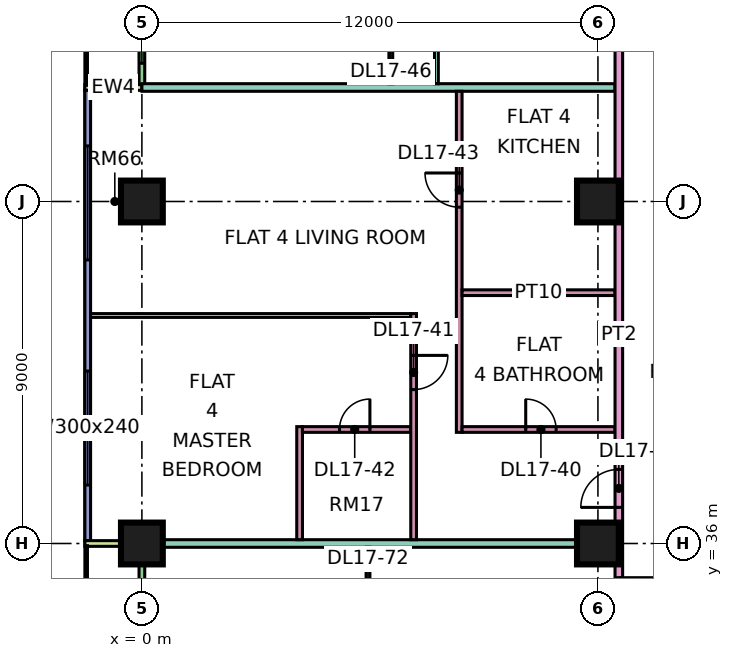
"""IFC4 building model, lengths in metres.
Left out: names, types, materials, properties, quantities, classifications, styles, units other than length and angle.
Written with IfcOpenShell. Run it as: python <this file> out.ifc"""

import sys

from ifc_helpers import new_model, si_unit, direction, frame, frame_2d, origin, origin_2d, place, context, subcontext, project, spatial, rectangle, extrude, element, fill, save


model = new_model("IFC4")
c1 = context("Model", 3, precision=1e-05, world=origin(), true_north=direction((0.0, 1.0)))
c2 = subcontext(c1, "Body", "Model", "MODEL_VIEW")
j1 = project(units=[si_unit("LENGTHUNIT", "METRE"), si_unit("PLANEANGLEUNIT", "RADIAN")], contexts=[c1])
p1 = place(None, origin())
s1 = spatial("IfcSite", under=j1, at=p1, CompositionType="ELEMENT")
p2 = place(p1, origin())
s2 = spatial("IfcBuilding", under=s1, at=p2, CompositionType="ELEMENT")
p3 = place(p2, frame((0.0, 0.0, 78.9)))
s3 = spatial("IfcBuildingStorey", under=s2, at=p3, CompositionType="ELEMENT", Elevation=78.9)
p4 = place(p3, frame((0.0, 36.0, 0.0), z_axis=(0.0, 0.0, 1.0), x_axis=(1.0, 0.0, 0.0)))
e1 = element("IfcColumn", 1, at=p4, inside=s3, PredefinedType="COLUMN", context=c2, shape_type="SweptSolid", body=[
    extrude(rectangle(XDim=1.1, YDim=1.1, at=origin_2d()), origin(), (0.0, 0.0, 1.0), 3.75),
])
for number, where, z_axis, x_axis in (
    (2, (0.0, 45.0, 0.0), (0.0, 0.0, 1.0), (1.0, 0.0, 0.0)),
    (3, (12.0, 36.0, 0.0), (0.0, 0.0, 1.0), (1.0, 0.0, 0.0)),
    (4, (12.0, 45.0, 0.0), (0.0, 0.0, 1.0), (1.0, 0.0, 0.0)),
):
    element("IfcColumn", number, at=place(p3, frame(where, z_axis=z_axis, x_axis=x_axis)), inside=s3, PredefinedType="COLUMN", context=c2, shape_type="SweptSolid", body=[
        extrude(rectangle(XDim=1.1, YDim=1.1, at=origin_2d()), origin(), (0.0, 0.0, 1.0), 3.75),
    ])
p5 = place(p3, frame((0.0, 61.425, 0.0), z_axis=(0.0, 0.0, 1.0), x_axis=(0.0, -1.0, 0.0)))
e5 = element("IfcWall", 5, at=p5, inside=s3, PredefinedType="SOLIDWALL", context=c2, shape_type="SweptSolid", body=[
    extrude(rectangle(XDim=13.35, YDim=0.15, at=frame_2d((6.675, 0.0))), origin(), (0.0, 0.0, 1.0), 3.35),
])
p6 = place(p5, frame((0.262, 0.0, 0.45)))
e6 = element("IfcOpeningElement", 6, at=p6, cuts=e5, PredefinedType="OPENING", context=c2, shape_type="SweptSolid", body=[
    extrude(rectangle(XDim=0.9, YDim=2.4, at=frame_2d((0.45, 1.2))), frame((0.0, 0.085, 0.0), z_axis=(0.0, -1.0, 0.0), x_axis=(1.0, 0.0, 0.0)), (0.0, 0.0, 1.0), 0.17),
])
p7 = place(p5, frame((3.2, 0.0, 0.0)))
e7 = element("IfcOpeningElement", 7, at=p7, cuts=e5, PredefinedType="OPENING", context=c2, shape_type="SweptSolid", body=[
    extrude(rectangle(XDim=1.8, YDim=2.4, at=frame_2d((0.9, 1.2))), frame((0.0, 0.085, 0.0), z_axis=(0.0, -1.0, 0.0), x_axis=(1.0, 0.0, 0.0)), (0.0, 0.0, 1.0), 0.17),
])
p8 = place(p5, frame((8.65, 0.0, 0.45)))
e8 = element("IfcOpeningElement", 8, at=p8, cuts=e5, PredefinedType="OPENING", context=c2, shape_type="SweptSolid", body=[
    extrude(rectangle(XDim=1.2, YDim=2.4, at=frame_2d((0.6, 1.2))), frame((0.0, 0.085, 0.0), z_axis=(0.0, -1.0, 0.0), x_axis=(1.0, 0.0, 0.0)), (0.0, 0.0, 1.0), 0.17),
])
p9 = place(p5, frame((10.988, 0.0, 0.45)))
e9 = element("IfcOpeningElement", 9, at=p9, cuts=e5, PredefinedType="OPENING", context=c2, shape_type="SweptSolid", body=[
    extrude(rectangle(XDim=1.8, YDim=2.4, at=frame_2d((0.9, 1.2))), frame((0.0, 0.085, 0.0), z_axis=(0.0, -1.0, 0.0), x_axis=(1.0, 0.0, 0.0)), (0.0, 0.0, 1.0), 0.17),
])
p10 = place(p3, frame((-1.5, 48.0, 0.0), z_axis=(0.0, 0.0, 1.0), x_axis=(1.0, 0.0, 0.0)))
e10 = element("IfcWall", 10, at=p10, inside=s3, PredefinedType="SOLIDWALL", context=c2, shape_type="SweptSolid", body=[
    extrude(rectangle(XDim=1.5, YDim=0.15, at=frame_2d((0.75, 0.0))), origin(), (0.0, 0.0, 1.0), 3.35),
])
p11 = place(p3, frame((-1.425, 47.925, 0.0), z_axis=(0.0, 0.0, 1.0), x_axis=(0.0, -1.0, 0.0)))
e11 = element("IfcWall", 11, at=p11, inside=s3, PredefinedType="SOLIDWALL", context=c2, shape_type="SweptSolid", body=[
    extrude(rectangle(XDim=11.85, YDim=0.15, at=frame_2d((5.925, 0.0))), origin(), (0.0, 0.0, 1.0), 3.35),
])
p12 = place(p11, frame((1.462, 0.0, 0.45)))
e12 = element("IfcOpeningElement", 12, at=p12, cuts=e11, PredefinedType="OPENING", context=c2, shape_type="SweptSolid", body=[
    extrude(rectangle(XDim=3.0, YDim=2.4, at=frame_2d((1.5, 1.2))), frame((0.0, 0.085, 0.0), z_axis=(0.0, -1.0, 0.0), x_axis=(1.0, 0.0, 0.0)), (0.0, 0.0, 1.0), 0.17),
])
p13 = place(p11, frame((7.387, 0.0, 0.45)))
e13 = element("IfcOpeningElement", 13, at=p13, cuts=e11, PredefinedType="OPENING", context=c2, shape_type="SweptSolid", body=[
    extrude(rectangle(XDim=3.0, YDim=2.4, at=frame_2d((1.5, 1.2))), frame((0.0, 0.085, 0.0), z_axis=(0.0, -1.0, 0.0), x_axis=(1.0, 0.0, 0.0)), (0.0, 0.0, 1.0), 0.17),
])
p14 = place(p3, frame((0.0, 35.925, 0.0), z_axis=(0.0, 0.0, 1.0), x_axis=(0.0, -1.0, 0.0)))
e14 = element("IfcWall", 14, at=p14, inside=s3, PredefinedType="SOLIDWALL", context=c2, shape_type="SweptSolid", body=[
    extrude(rectangle(XDim=11.85, YDim=0.15, at=frame_2d((5.925, 0.0))), origin(), (0.0, 0.0, 1.0), 3.35),
])
p15 = place(p14, frame((1.15, 0.0, 0.45)))
e15 = element("IfcOpeningElement", 15, at=p15, cuts=e14, PredefinedType="OPENING", context=c2, shape_type="SweptSolid", body=[
    extrude(rectangle(XDim=1.2, YDim=2.4, at=frame_2d((0.6, 1.2))), frame((0.0, 0.085, 0.0), z_axis=(0.0, -1.0, 0.0), x_axis=(1.0, 0.0, 0.0)), (0.0, 0.0, 1.0), 0.17),
])
p16 = place(p14, frame((5.025, 0.0, 0.0)))
e16 = element("IfcOpeningElement", 16, at=p16, cuts=e14, PredefinedType="OPENING", context=c2, shape_type="SweptSolid", body=[
    extrude(rectangle(XDim=1.8, YDim=2.4, at=frame_2d((0.9, 1.2))), frame((0.0, 0.085, 0.0), z_axis=(0.0, -1.0, 0.0), x_axis=(1.0, 0.0, 0.0)), (0.0, 0.0, 1.0), 0.17),
])
p17 = place(p14, frame((9.5, 0.0, 0.45)))
e17 = element("IfcOpeningElement", 17, at=p17, cuts=e14, PredefinedType="OPENING", context=c2, shape_type="SweptSolid", body=[
    extrude(rectangle(XDim=1.2, YDim=2.4, at=frame_2d((0.6, 1.2))), frame((0.0, 0.085, 0.0), z_axis=(0.0, -1.0, 0.0), x_axis=(1.0, 0.0, 0.0)), (0.0, 0.0, 1.0), 0.17),
])
p18 = place(p3, frame((-1.5, 36.0, 0.0), z_axis=(0.0, 0.0, 1.0), x_axis=(1.0, 0.0, 0.0)))
e18 = element("IfcWall", 18, at=p18, inside=s3, PredefinedType="SOLIDWALL", context=c2, shape_type="SweptSolid", body=[
    extrude(rectangle(XDim=1.5, YDim=0.15, at=frame_2d((0.75, 0.0))), origin(), (0.0, 0.0, 1.0), 3.35),
])
e19 = element("IfcWall", 19, at=p4, inside=s3, PredefinedType="PARTITIONING", context=c2, shape_type="SweptSolid", body=[
    extrude(rectangle(XDim=12.45, YDim=0.2, at=frame_2d((6.225, 0.0))), origin(), (0.0, 0.0, 1.0), 3.35),
])
p19 = place(p3, frame((-1.35, 42.0, 0.0), z_axis=(0.0, 0.0, 1.0), x_axis=(1.0, 0.0, 0.0)))
e20 = element("IfcWall", 20, at=p19, inside=s3, PredefinedType="PARTITIONING", context=c2, shape_type="SweptSolid", body=[
    extrude(rectangle(XDim=8.425, YDim=0.1, at=frame_2d((4.212, 0.0))), origin(), (0.0, 0.0, 1.0), 3.35),
])
p20 = place(p3, frame((0.0, 48.0, 0.0), z_axis=(0.0, 0.0, 1.0), x_axis=(1.0, 0.0, 0.0)))
e21 = element("IfcWall", 21, at=p20, inside=s3, PredefinedType="PARTITIONING", context=c2, shape_type="SweptSolid", body=[
    extrude(rectangle(XDim=12.45, YDim=0.2, at=frame_2d((6.225, 0.0))), origin(), (0.0, 0.0, 1.0), 3.35),
])
p21 = place(p3, frame((4.15, 36.1, 0.0), z_axis=(0.0, 0.0, 1.0), x_axis=(0.0, 1.0, 0.0)))
e22 = element("IfcWall", 22, at=p21, inside=s3, PredefinedType="PARTITIONING", context=c2, shape_type="SweptSolid", body=[
    extrude(rectangle(XDim=2.975, YDim=0.15, at=frame_2d((1.487, 0.0))), origin(), (0.0, 0.0, 1.0), 3.35),
])
p22 = place(p3, frame((4.225, 39.0, 0.0), z_axis=(0.0, 0.0, 1.0), x_axis=(1.0, 0.0, 0.0)))
e23 = element("IfcWall", 23, at=p22, inside=s3, PredefinedType="PARTITIONING", context=c2, shape_type="SweptSolid", body=[
    extrude(rectangle(XDim=2.85, YDim=0.15, at=frame_2d((1.425, 0.0))), origin(), (0.0, 0.0, 1.0), 3.35),
])
p23 = place(p22, frame((0.975, 0.0, 0.0)))
e24 = element("IfcOpeningElement", 24, at=p23, cuts=e23, PredefinedType="OPENING", context=c2, shape_type="SweptSolid", body=[
    extrude(rectangle(XDim=0.8, YDim=2.1, at=frame_2d((0.4, 1.05))), frame((0.0, 0.085, 0.0), z_axis=(0.0, -1.0, 0.0), x_axis=(1.0, 0.0, 0.0)), (0.0, 0.0, 1.0), 0.17),
])
p24 = place(p3, frame((5.95, 33.05, 0.0), z_axis=(0.0, 0.0, 1.0), x_axis=(0.0, 1.0, 0.0)))
e25 = element("IfcWall", 25, at=p24, inside=s3, PredefinedType="PARTITIONING", context=c2, shape_type="SweptSolid", body=[
    extrude(rectangle(XDim=2.85, YDim=0.1, at=frame_2d((1.425, 0.0))), origin(), (0.0, 0.0, 1.0), 3.35),
])
p25 = place(p24, frame((1.0, 0.0, 0.0)))
e26 = element("IfcOpeningElement", 26, at=p25, cuts=e25, PredefinedType="OPENING", context=c2, shape_type="SweptSolid", body=[
    extrude(rectangle(XDim=0.9, YDim=2.1, at=frame_2d((0.45, 1.05))), frame((0.0, 0.06, 0.0), z_axis=(0.0, -1.0, 0.0), x_axis=(1.0, 0.0, 0.0)), (0.0, 0.0, 1.0), 0.12),
])
p26 = place(p3, frame((6.55, 48.1, 0.0), z_axis=(0.0, 0.0, 1.0), x_axis=(0.0, 1.0, 0.0)))
e27 = element("IfcWall", 27, at=p26, inside=s3, PredefinedType="PARTITIONING", context=c2, shape_type="SweptSolid", body=[
    extrude(rectangle(XDim=5.85, YDim=0.1, at=frame_2d((2.925, 0.0))), origin(), (0.0, 0.0, 1.0), 3.35),
])
p27 = place(p26, frame((0.95, 0.0, 0.0)))
e28 = element("IfcOpeningElement", 28, at=p27, cuts=e27, PredefinedType="OPENING", context=c2, shape_type="SweptSolid", body=[
    extrude(rectangle(XDim=0.9, YDim=2.1, at=frame_2d((0.45, 1.05))), frame((0.0, 0.06, 0.0), z_axis=(0.0, -1.0, 0.0), x_axis=(1.0, 0.0, 0.0)), (0.0, 0.0, 1.0), 0.12),
])
p28 = place(p26, frame((3.95, 0.0, 0.0)))
e29 = element("IfcOpeningElement", 29, at=p28, cuts=e27, PredefinedType="OPENING", context=c2, shape_type="SweptSolid", body=[
    extrude(rectangle(XDim=0.9, YDim=2.1, at=frame_2d((0.45, 1.05))), frame((0.0, 0.06, 0.0), z_axis=(0.0, -1.0, 0.0), x_axis=(1.0, 0.0, 0.0)), (0.0, 0.0, 1.0), 0.12),
])
p29 = place(p3, frame((7.15, 36.1, 0.0), z_axis=(0.0, 0.0, 1.0), x_axis=(0.0, 1.0, 0.0)))
e30 = element("IfcWall", 30, at=p29, inside=s3, PredefinedType="PARTITIONING", context=c2, shape_type="SweptSolid", body=[
    extrude(rectangle(XDim=5.95, YDim=0.15, at=frame_2d((2.975, 0.0))), origin(), (0.0, 0.0, 1.0), 3.35),
])
p30 = place(p29, frame((3.95, 0.0, 0.0)))
e31 = element("IfcOpeningElement", 31, at=p30, cuts=e30, PredefinedType="OPENING", context=c2, shape_type="SweptSolid", body=[
    extrude(rectangle(XDim=0.9, YDim=2.1, at=frame_2d((0.45, 1.05))), frame((0.0, 0.085, 0.0), z_axis=(0.0, -1.0, 0.0), x_axis=(1.0, 0.0, 0.0)), (0.0, 0.0, 1.0), 0.17),
])
p31 = place(p3, frame((7.75, 48.1, 0.0), z_axis=(0.0, 0.0, 1.0), x_axis=(0.0, 1.0, 0.0)))
e32 = element("IfcWall", 32, at=p31, inside=s3, PredefinedType="PARTITIONING", context=c2, shape_type="SweptSolid", body=[
    extrude(rectangle(XDim=6.25, YDim=0.1, at=frame_2d((3.125, 0.0))), origin(), (0.0, 0.0, 1.0), 3.35),
])
p32 = place(p31, frame((2.6, 0.0, 0.0)))
e33 = element("IfcOpeningElement", 33, at=p32, cuts=e32, PredefinedType="OPENING", context=c2, shape_type="SweptSolid", body=[
    extrude(rectangle(XDim=0.9, YDim=2.1, at=frame_2d((0.45, 1.05))), frame((0.0, 0.06, 0.0), z_axis=(0.0, -1.0, 0.0), x_axis=(1.0, 0.0, 0.0)), (0.0, 0.0, 1.0), 0.12),
])
p33 = place(p3, frame((8.35, 38.925, 0.0), z_axis=(0.0, 0.0, 1.0), x_axis=(0.0, 1.0, 0.0)))
e34 = element("IfcWall", 34, at=p33, inside=s3, PredefinedType="PARTITIONING", context=c2, shape_type="SweptSolid", body=[
    extrude(rectangle(XDim=8.975, YDim=0.15, at=frame_2d((4.487, 0.0))), origin(), (0.0, 0.0, 1.0), 3.35),
])
p34 = place(p33, frame((5.925, 0.0, 0.0)))
e35 = element("IfcOpeningElement", 35, at=p34, cuts=e34, PredefinedType="OPENING", context=c2, shape_type="SweptSolid", body=[
    extrude(rectangle(XDim=0.9, YDim=2.1, at=frame_2d((0.45, 1.05))), frame((0.0, 0.085, 0.0), z_axis=(0.0, -1.0, 0.0), x_axis=(1.0, 0.0, 0.0)), (0.0, 0.0, 1.0), 0.17),
])
p35 = place(p3, frame((8.425, 39.0, 0.0), z_axis=(0.0, 0.0, 1.0), x_axis=(1.0, 0.0, 0.0)))
e36 = element("IfcWall", 36, at=p35, inside=s3, PredefinedType="PARTITIONING", context=c2, shape_type="SweptSolid", body=[
    extrude(rectangle(XDim=4.025, YDim=0.15, at=frame_2d((2.012, 0.0))), origin(), (0.0, 0.0, 1.0), 3.35),
])
p36 = place(p35, frame((1.675, 0.0, 0.0)))
e37 = element("IfcOpeningElement", 37, at=p36, cuts=e36, PredefinedType="OPENING", context=c2, shape_type="SweptSolid", body=[
    extrude(rectangle(XDim=0.8, YDim=2.1, at=frame_2d((0.4, 1.05))), frame((0.0, 0.085, 0.0), z_axis=(0.0, -1.0, 0.0), x_axis=(1.0, 0.0, 0.0)), (0.0, 0.0, 1.0), 0.17),
])
p37 = place(p3, frame((8.425, 42.6, 0.0), z_axis=(0.0, 0.0, 1.0), x_axis=(1.0, 0.0, 0.0)))
e38 = element("IfcWall", 38, at=p37, inside=s3, PredefinedType="PARTITIONING", context=c2, shape_type="SweptSolid", body=[
    extrude(rectangle(XDim=4.025, YDim=0.15, at=frame_2d((2.012, 0.0))), origin(), (0.0, 0.0, 1.0), 3.35),
])
p38 = place(p3, frame((12.55, 20.0, 0.0), z_axis=(0.0, 0.0, 1.0), x_axis=(0.0, 1.0, 0.0)))
e39 = element("IfcWall", 39, at=p38, inside=s3, PredefinedType="PARTITIONING", context=c2, shape_type="SweptSolid", body=[
    extrude(rectangle(XDim=43.0, YDim=0.2, at=frame_2d((21.5, 0.0))), origin(), (0.0, 0.0, 1.0), 3.35),
])
p39 = place(p38, frame((16.95, 0.0, 0.0)))
e40 = element("IfcOpeningElement", 40, at=p39, cuts=e39, PredefinedType="OPENING", context=c2, shape_type="SweptSolid", body=[
    extrude(rectangle(XDim=1.0, YDim=2.1, at=frame_2d((0.5, 1.05))), frame((0.0, 0.11, 0.0), z_axis=(0.0, -1.0, 0.0), x_axis=(1.0, 0.0, 0.0)), (0.0, 0.0, 1.0), 0.22),
])
p40 = place(p38, frame((35.25, 0.0, 0.0)))
e41 = element("IfcOpeningElement", 41, at=p40, cuts=e39, PredefinedType="OPENING", context=c2, shape_type="SweptSolid", body=[
    extrude(rectangle(XDim=1.0, YDim=2.1, at=frame_2d((0.5, 1.05))), frame((0.0, 0.11, 0.0), z_axis=(0.0, -1.0, 0.0), x_axis=(1.0, 0.0, 0.0)), (0.0, 0.0, 1.0), 0.22),
])
p41 = place(p38, frame((0.6, 0.0, 0.0)))
e42 = element("IfcOpeningElement", 42, at=p41, cuts=e39, PredefinedType="OPENING", context=c2, shape_type="SweptSolid", body=[
    extrude(rectangle(XDim=1.2, YDim=2.1, at=frame_2d((0.6, 1.05))), frame((0.0, 0.11, 0.0), z_axis=(0.0, -1.0, 0.0), x_axis=(1.0, 0.0, 0.0)), (0.0, 0.0, 1.0), 0.22),
])
p42 = place(p38, frame((14.1, 0.0, 0.0)))
e43 = element("IfcOpeningElement", 43, at=p42, cuts=e39, PredefinedType="OPENING", context=c2, shape_type="SweptSolid", body=[
    extrude(rectangle(XDim=1.0, YDim=2.1, at=frame_2d((0.5, 1.05))), frame((0.0, 0.11, 0.0), z_axis=(0.0, -1.0, 0.0), x_axis=(1.0, 0.0, 0.0)), (0.0, 0.0, 1.0), 0.22),
])
p43 = place(p9, origin())
e44 = element("IfcWindow", 44, at=p43, inside=s3, PartitioningType="SINGLE_PANEL", PredefinedType="WINDOW", context=c2, shape_type="SweptSolid", body=[
    extrude(rectangle(XDim=1.8, YDim=2.4, at=frame_2d((0.9, 1.2))), frame((0.0, 0.03, 0.0), z_axis=(0.0, -1.0, 0.0), x_axis=(1.0, 0.0, 0.0)), (0.0, 0.0, 1.0), 0.06),
])
fill(e9, e44)
p44 = place(p12, origin())
e45 = element("IfcWindow", 45, at=p44, inside=s3, PartitioningType="SINGLE_PANEL", PredefinedType="WINDOW", context=c2, shape_type="SweptSolid", body=[
    extrude(rectangle(XDim=3.0, YDim=2.4, at=frame_2d((1.5, 1.2))), frame((0.0, 0.03, 0.0), z_axis=(0.0, -1.0, 0.0), x_axis=(1.0, 0.0, 0.0)), (0.0, 0.0, 1.0), 0.06),
])
fill(e12, e45)
p45 = place(p13, origin())
e46 = element("IfcWindow", 46, at=p45, inside=s3, PartitioningType="SINGLE_PANEL", PredefinedType="WINDOW", context=c2, shape_type="SweptSolid", body=[
    extrude(rectangle(XDim=3.0, YDim=2.4, at=frame_2d((1.5, 1.2))), frame((0.0, 0.03, 0.0), z_axis=(0.0, -1.0, 0.0), x_axis=(1.0, 0.0, 0.0)), (0.0, 0.0, 1.0), 0.06),
])
fill(e13, e46)
p46 = place(p36, origin())
e47 = element("IfcDoor", 47, at=p46, inside=s3, OperationType="SINGLE_SWING_LEFT", PredefinedType="DOOR", context=c2, shape_type="SweptSolid", body=[
    extrude(rectangle(XDim=0.8, YDim=2.1, at=frame_2d((0.4, 1.05))), frame((0.0, 0.025, 0.0), z_axis=(0.0, -1.0, 0.0), x_axis=(1.0, 0.0, 0.0)), (0.0, 0.0, 1.0), 0.05),
])
fill(e37, e47)
p47 = place(p30, origin())
e48 = element("IfcDoor", 48, at=p47, inside=s3, OperationType="SINGLE_SWING_RIGHT", PredefinedType="DOOR", context=c2, shape_type="SweptSolid", body=[
    extrude(rectangle(XDim=0.9, YDim=2.1, at=frame_2d((0.45, 1.05))), frame((0.0, 0.025, 0.0), z_axis=(0.0, -1.0, 0.0), x_axis=(1.0, 0.0, 0.0)), (0.0, 0.0, 1.0), 0.05),
])
fill(e31, e48)
p48 = place(p23, frame((0.8, 0.0, 0.0), z_axis=(0.0, 0.0, 1.0), x_axis=(-1.0, 0.0, 0.0)))
e49 = element("IfcDoor", 49, at=p48, inside=s3, OperationType="SINGLE_SWING_RIGHT", PredefinedType="DOOR", context=c2, shape_type="SweptSolid", body=[
    extrude(rectangle(XDim=0.8, YDim=2.1, at=frame_2d((0.4, 1.05))), frame((0.0, 0.025, 0.0), z_axis=(0.0, -1.0, 0.0), x_axis=(1.0, 0.0, 0.0)), (0.0, 0.0, 1.0), 0.05),
])
fill(e24, e49)
p49 = place(p34, frame((0.9, 0.0, 0.0), z_axis=(0.0, 0.0, 1.0), x_axis=(-1.0, 0.0, 0.0)))
e50 = element("IfcDoor", 50, at=p49, inside=s3, OperationType="SINGLE_SWING_RIGHT", PredefinedType="DOOR", context=c2, shape_type="SweptSolid", body=[
    extrude(rectangle(XDim=0.9, YDim=2.1, at=frame_2d((0.45, 1.05))), frame((0.0, 0.025, 0.0), z_axis=(0.0, -1.0, 0.0), x_axis=(1.0, 0.0, 0.0)), (0.0, 0.0, 1.0), 0.05),
])
fill(e35, e50)
p50 = place(p39, origin())
e51 = element("IfcDoor", 51, at=p50, inside=s3, OperationType="SINGLE_SWING_LEFT", PredefinedType="DOOR", context=c2, shape_type="SweptSolid", body=[
    extrude(rectangle(XDim=1.0, YDim=2.1, at=frame_2d((0.5, 1.05))), frame((0.0, 0.025, 0.0), z_axis=(0.0, -1.0, 0.0), x_axis=(1.0, 0.0, 0.0)), (0.0, 0.0, 1.0), 0.05),
])
fill(e40, e51)
p51 = place(p42, origin())
e52 = element("IfcDoor", 52, at=p51, inside=s3, OperationType="SINGLE_SWING_RIGHT", PredefinedType="DOOR", context=c2, shape_type="SweptSolid", body=[
    extrude(rectangle(XDim=1.0, YDim=2.1, at=frame_2d((0.5, 1.05))), frame((0.0, 0.025, 0.0), z_axis=(0.0, -1.0, 0.0), x_axis=(1.0, 0.0, 0.0)), (0.0, 0.0, 1.0), 0.05),
])
fill(e43, e52)
save(model, sys.argv[1])
